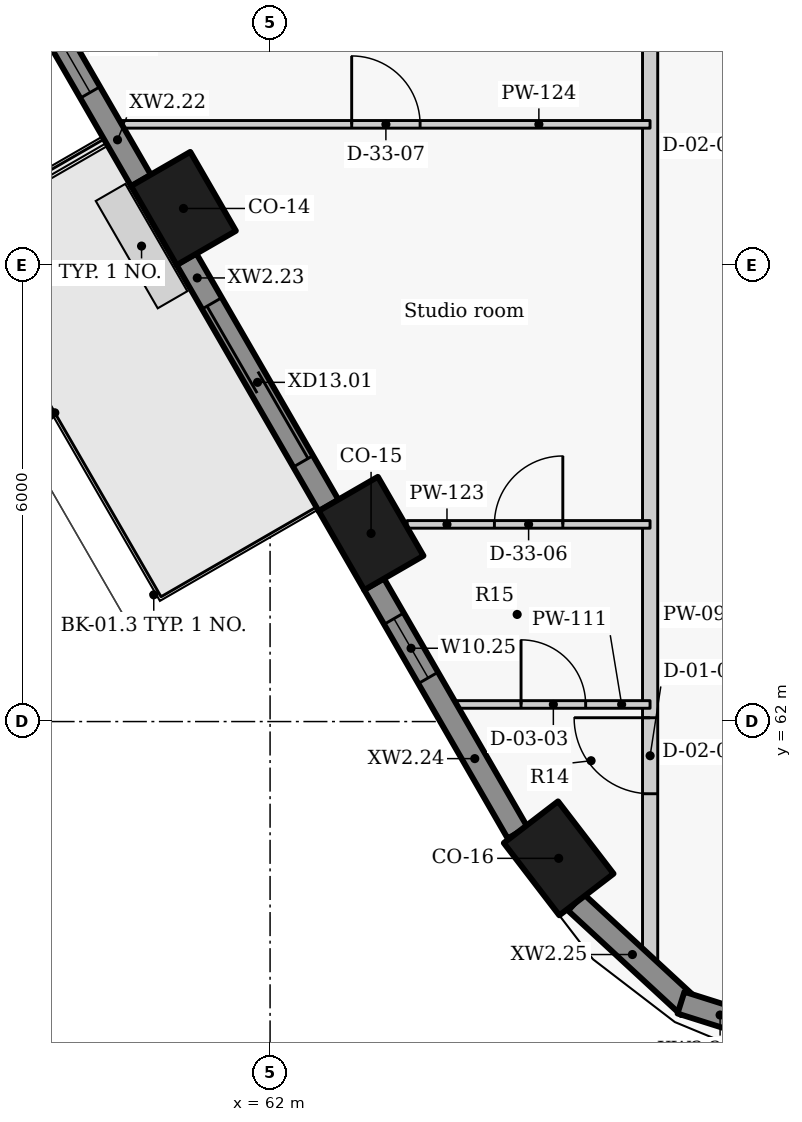
"""IFC4 building model, lengths in metres.
Left out: names, types, materials, properties, quantities, classifications, styles, units other than length and angle.
Written with IfcOpenShell. Run it as: python <this file> out.ifc"""

import sys

from ifc_helpers import new_model, si_unit, direction, frame, frame_2d, origin, origin_2d, place, context, subcontext, project, spatial, rectangle, extrude, element, fill, save


model = new_model("IFC4")
c1 = context("Model", 3, precision=1e-05, world=origin(), true_north=direction((0.0, 1.0)))
c2 = subcontext(c1, "Body", "Model", "MODEL_VIEW")
j1 = project(units=[si_unit("LENGTHUNIT", "METRE"), si_unit("PLANEANGLEUNIT", "RADIAN")], contexts=[c1])
p1 = place(None, origin())
s1 = spatial("IfcSite", under=j1, at=p1, CompositionType="ELEMENT")
p2 = place(p1, origin())
s2 = spatial("IfcBuilding", under=s1, at=p2, CompositionType="ELEMENT")
p3 = place(p2, frame((0.0, 0.0, 183.3)))
s3 = spatial("IfcBuildingStorey", under=s2, at=p3, CompositionType="ELEMENT", Elevation=183.3)
for number, where, z_axis, x_axis in (
    (1, (60.861, 68.75, 0.0), (0.0, 0.0, 1.0), (0.5, -0.866, 0.0)),
    (2, (63.329, 64.475, 0.0), (0.0, 0.0, 1.0), (0.5, -0.866, 0.0)),
    (3, (65.797, 60.2, 0.0), (0.0, 0.0, 1.0), (0.609, -0.793, 0.0)),
):
    element("IfcColumn", number, at=place(p3, frame(where, z_axis=z_axis, x_axis=x_axis)), inside=s3, PredefinedType="COLUMN", context=c2, shape_type="SweptSolid", body=[
        extrude(rectangle(XDim=1.2, YDim=0.9, at=origin_2d()), origin(), (0.0, 0.0, 1.0), 3.3),
    ])
p4 = place(p3, frame((58.579, 72.102, 0.0), z_axis=(0.0, 0.0, 1.0), x_axis=(0.499955427682, -0.866051136095, 0.0)))
e4 = element("IfcWall", 4, at=p4, inside=s3, PredefinedType="SOLIDWALL", context=c2, shape_type="SweptSolid", body=[
    extrude(rectangle(XDim=3.447, YDim=0.3, at=frame_2d((1.724, 0.0))), origin(), (0.0, 0.0, 1.0), 2.425),
])
p5 = place(p4, frame((0.607, 0.0, 0.9)))
e5 = element("IfcOpeningElement", 5, at=p5, cuts=e4, PredefinedType="OPENING", context=c2, shape_type="SweptSolid", body=[
    extrude(rectangle(XDim=1.5, YDim=1.1, at=frame_2d((0.75, 0.55))), frame((0.0, 0.16, 0.0), z_axis=(0.0, -1.0, 0.0), x_axis=(1.0, 0.0, 0.0)), (0.0, 0.0, 1.0), 0.32),
])
p6 = place(p3, frame((60.899, 68.084, 0.0), z_axis=(0.0, 0.0, 1.0), x_axis=(0.500059225181, -0.86599120741, 0.0)))
e6 = element("IfcWall", 6, at=p6, inside=s3, PredefinedType="SOLIDWALL", context=c2, shape_type="SweptSolid", body=[
    extrude(rectangle(XDim=3.744, YDim=0.3, at=frame_2d((1.872, 0.0))), origin(), (0.0, 0.0, 1.0), 2.425),
])
p7 = place(p6, frame((0.672, 0.0, 0.0)))
e7 = element("IfcOpeningElement", 7, at=p7, cuts=e6, PredefinedType="OPENING", context=c2, shape_type="SweptSolid", body=[
    extrude(rectangle(XDim=2.4, YDim=2.0, at=frame_2d((1.2, 1.0))), frame((0.0, 0.16, 0.0), z_axis=(0.0, -1.0, 0.0), x_axis=(1.0, 0.0, 0.0)), (0.0, 0.0, 1.0), 0.32),
])
p8 = place(p3, frame((63.367, 63.809, 0.0), z_axis=(0.0, 0.0, 1.0), x_axis=(0.499961087031, -0.866047869032, 0.0)))
e8 = element("IfcWall", 8, at=p8, inside=s3, PredefinedType="SOLIDWALL", context=c2, shape_type="SweptSolid", body=[
    extrude(rectangle(XDim=3.779, YDim=0.3, at=frame_2d((1.889, 0.0))), origin(), (0.0, 0.0, 1.0), 2.425),
])
p9 = place(p8, frame((0.526, 0.0, 1.5)))
e9 = element("IfcOpeningElement", 9, at=p9, cuts=e8, PredefinedType="OPENING", context=c2, shape_type="SweptSolid", body=[
    extrude(rectangle(XDim=0.9, YDim=0.5, at=frame_2d((0.45, 0.25))), frame((0.0, 0.16, 0.0), z_axis=(0.0, -1.0, 0.0), x_axis=(1.0, 0.0, 0.0)), (0.0, 0.0, 1.0), 0.32),
])
p10 = place(p3, frame((66.022, 59.622, 0.0), z_axis=(0.0, 0.0, 1.0), x_axis=(0.734627852992, -0.678470277616, 0.0)))
e10 = element("IfcWall", 10, at=p10, inside=s3, PredefinedType="SOLIDWALL", context=c2, shape_type="SweptSolid", body=[
    extrude(rectangle(XDim=2.026, YDim=0.3, at=frame_2d((1.013, 0.0))), origin(), (0.0, 0.0, 1.0), 2.425),
])
p11 = place(p3, frame((67.406, 58.302, 0.0), z_axis=(0.0, 0.0, 1.0), x_axis=(0.953537608367, -0.301274010545, 0.0)))
e11 = element("IfcWall", 11, at=p11, inside=s3, PredefinedType="SOLIDWALL", context=c2, shape_type="SweptSolid", body=[
    extrude(rectangle(XDim=2.048, YDim=0.3, at=frame_2d((1.024, 0.0))), origin(), (0.0, 0.0, 1.0), 2.425),
])
p12 = place(p11, frame((1.18, 0.0, 0.9)))
e12 = element("IfcOpeningElement", 12, at=p12, cuts=e11, PredefinedType="OPENING", context=c2, shape_type="SweptSolid", body=[
    extrude(rectangle(XDim=0.6, YDim=1.1, at=frame_2d((0.3, 0.55))), frame((0.0, 0.16, 0.0), z_axis=(0.0, -1.0, 0.0), x_axis=(1.0, 0.0, 0.0)), (0.0, 0.0, 1.0), 0.32),
])
p13 = place(p3, frame((67.0, 58.674, 0.0), z_axis=(0.0, 0.0, 1.0), x_axis=(0.0, 1.0, 0.0)))
e13 = element("IfcWall", 13, at=p13, inside=s3, PredefinedType="PARTITIONING", context=c2, shape_type="SweptSolid", body=[
    extrude(rectangle(XDim=42.592, YDim=0.2, at=frame_2d((21.296, 0.0))), origin(), (0.0, 0.0, 1.0), 2.405),
])
p14 = place(p13, frame((2.376, 0.0, 0.0)))
e14 = element("IfcOpeningElement", 14, at=p14, cuts=e13, PredefinedType="OPENING", context=c2, shape_type="SweptSolid", body=[
    extrude(rectangle(XDim=1.0, YDim=2.1, at=frame_2d((0.5, 1.05))), frame((0.0, 0.11, 0.0), z_axis=(0.0, -1.0, 0.0), x_axis=(1.0, 0.0, 0.0)), (0.0, 0.0, 1.0), 0.22),
])
p15 = place(p13, frame((13.826, 0.0, 0.0)))
e15 = element("IfcOpeningElement", 15, at=p15, cuts=e13, PredefinedType="OPENING", context=c2, shape_type="SweptSolid", body=[
    extrude(rectangle(XDim=1.0, YDim=2.1, at=frame_2d((0.5, 1.05))), frame((0.0, 0.11, 0.0), z_axis=(0.0, -1.0, 0.0), x_axis=(1.0, 0.0, 0.0)), (0.0, 0.0, 1.0), 0.22),
])
p16 = place(p13, frame((35.957, 0.0, 0.0)))
e16 = element("IfcOpeningElement", 16, at=p16, cuts=e13, PredefinedType="OPENING", context=c2, shape_type="SweptSolid", body=[
    extrude(rectangle(XDim=1.0, YDim=2.1, at=frame_2d((0.5, 1.05))), frame((0.0, 0.11, 0.0), z_axis=(0.0, -1.0, 0.0), x_axis=(1.0, 0.0, 0.0)), (0.0, 0.0, 1.0), 0.22),
])
p17 = place(p3, frame((64.455, 62.225, 0.0), z_axis=(0.0, 0.0, 1.0), x_axis=(1.0, 0.0, 0.0)))
e17 = element("IfcWall", 17, at=p17, inside=s3, PredefinedType="PARTITIONING", context=c2, shape_type="SweptSolid", body=[
    extrude(rectangle(XDim=2.544, YDim=0.1, at=frame_2d((1.272, 0.0))), origin(), (0.0, 0.0, 1.0), 2.405),
])
p18 = place(p17, frame((0.847, 0.0, 0.0)))
e18 = element("IfcOpeningElement", 18, at=p18, cuts=e17, PredefinedType="OPENING", context=c2, shape_type="SweptSolid", body=[
    extrude(rectangle(XDim=0.85, YDim=2.1, at=frame_2d((0.425, 1.05))), frame((0.0, 0.06, 0.0), z_axis=(0.0, -1.0, 0.0), x_axis=(1.0, 0.0, 0.0)), (0.0, 0.0, 1.0), 0.12),
])
p19 = place(p3, frame((63.803, 64.594, 0.0), z_axis=(0.0, 0.0, 1.0), x_axis=(1.0, 0.0, 0.0)))
e19 = element("IfcWall", 19, at=p19, inside=s3, PredefinedType="PARTITIONING", context=c2, shape_type="SweptSolid", body=[
    extrude(rectangle(XDim=3.196, YDim=0.1, at=frame_2d((1.598, 0.0))), origin(), (0.0, 0.0, 1.0), 3.025),
])
p20 = place(p19, frame((1.148, 0.0, 0.0)))
e20 = element("IfcOpeningElement", 20, at=p20, cuts=e19, PredefinedType="OPENING", context=c2, shape_type="SweptSolid", body=[
    extrude(rectangle(XDim=0.9, YDim=2.1, at=frame_2d((0.45, 1.05))), frame((0.0, 0.06, 0.0), z_axis=(0.0, -1.0, 0.0), x_axis=(1.0, 0.0, 0.0)), (0.0, 0.0, 1.0), 0.12),
])
p21 = place(p3, frame((60.049, 69.857, 0.0), z_axis=(0.0, 0.0, 1.0), x_axis=(1.0, 0.0, 0.0)))
e21 = element("IfcWall", 21, at=p21, inside=s3, PredefinedType="PARTITIONING", context=c2, shape_type="SweptSolid", body=[
    extrude(rectangle(XDim=6.95, YDim=0.1, at=frame_2d((3.475, 0.0))), origin(), (0.0, 0.0, 1.0), 2.405),
])
p22 = place(p21, frame((3.025, 0.0, 0.0)))
e22 = element("IfcOpeningElement", 22, at=p22, cuts=e21, PredefinedType="OPENING", context=c2, shape_type="SweptSolid", body=[
    extrude(rectangle(XDim=0.9, YDim=2.1, at=frame_2d((0.45, 1.05))), frame((0.0, 0.06, 0.0), z_axis=(0.0, -1.0, 0.0), x_axis=(1.0, 0.0, 0.0)), (0.0, 0.0, 1.0), 0.12),
])
p23 = place(p5, origin())
e23 = element("IfcWindow", 23, at=p23, inside=s3, PartitioningType="SINGLE_PANEL", PredefinedType="WINDOW", context=c2, shape_type="SweptSolid", body=[
    extrude(rectangle(XDim=1.5, YDim=1.1, at=frame_2d((0.75, 0.55))), frame((0.0, 0.03, 0.0), z_axis=(0.0, -1.0, 0.0), x_axis=(1.0, 0.0, 0.0)), (0.0, 0.0, 1.0), 0.06),
])
fill(e5, e23)
p24 = place(p7, origin())
e24 = element("IfcDoor", 24, at=p24, inside=s3, OperationType="DOUBLE_DOOR_SLIDING", PredefinedType="DOOR", context=c2, shape_type="SweptSolid", body=[
    extrude(rectangle(XDim=2.4, YDim=2.0, at=frame_2d((1.2, 1.0))), frame((0.0, 0.025, 0.0), z_axis=(0.0, -1.0, 0.0), x_axis=(1.0, 0.0, 0.0)), (0.0, 0.0, 1.0), 0.05),
])
fill(e7, e24)
p25 = place(p9, origin())
e25 = element("IfcWindow", 25, at=p25, inside=s3, PartitioningType="SINGLE_PANEL", PredefinedType="WINDOW", context=c2, shape_type="SweptSolid", body=[
    extrude(rectangle(XDim=0.9, YDim=0.5, at=frame_2d((0.45, 0.25))), frame((0.0, 0.03, 0.0), z_axis=(0.0, -1.0, 0.0), x_axis=(1.0, 0.0, 0.0)), (0.0, 0.0, 1.0), 0.06),
])
fill(e9, e25)
p26 = place(p14, origin())
e26 = element("IfcDoor", 26, at=p26, inside=s3, OperationType="SINGLE_SWING_RIGHT", PredefinedType="DOOR", context=c2, shape_type="SweptSolid", body=[
    extrude(rectangle(XDim=1.0, YDim=2.1, at=frame_2d((0.5, 1.05))), frame((0.0, 0.025, 0.0), z_axis=(0.0, -1.0, 0.0), x_axis=(1.0, 0.0, 0.0)), (0.0, 0.0, 1.0), 0.05),
])
fill(e14, e26)
p27 = place(p18, origin())
e27 = element("IfcDoor", 27, at=p27, inside=s3, OperationType="SINGLE_SWING_LEFT", PredefinedType="DOOR", context=c2, shape_type="SweptSolid", body=[
    extrude(rectangle(XDim=0.85, YDim=2.1, at=frame_2d((0.425, 1.05))), frame((0.0, 0.025, 0.0), z_axis=(0.0, -1.0, 0.0), x_axis=(1.0, 0.0, 0.0)), (0.0, 0.0, 1.0), 0.05),
])
fill(e18, e27)
p28 = place(p20, origin())
e28 = element("IfcDoor", 28, at=p28, inside=s3, OperationType="SINGLE_SWING_RIGHT", PredefinedType="DOOR", context=c2, shape_type="SweptSolid", body=[
    extrude(rectangle(XDim=0.9, YDim=2.1, at=frame_2d((0.45, 1.05))), frame((0.0, 0.025, 0.0), z_axis=(0.0, -1.0, 0.0), x_axis=(1.0, 0.0, 0.0)), (0.0, 0.0, 1.0), 0.05),
])
fill(e20, e28)
p29 = place(p22, origin())
e29 = element("IfcDoor", 29, at=p29, inside=s3, OperationType="SINGLE_SWING_LEFT", PredefinedType="DOOR", context=c2, shape_type="SweptSolid", body=[
    extrude(rectangle(XDim=0.9, YDim=2.1, at=frame_2d((0.45, 1.05))), frame((0.0, 0.025, 0.0), z_axis=(0.0, -1.0, 0.0), x_axis=(1.0, 0.0, 0.0)), (0.0, 0.0, 1.0), 0.05),
])
fill(e22, e29)
save(model, sys.argv[1])
